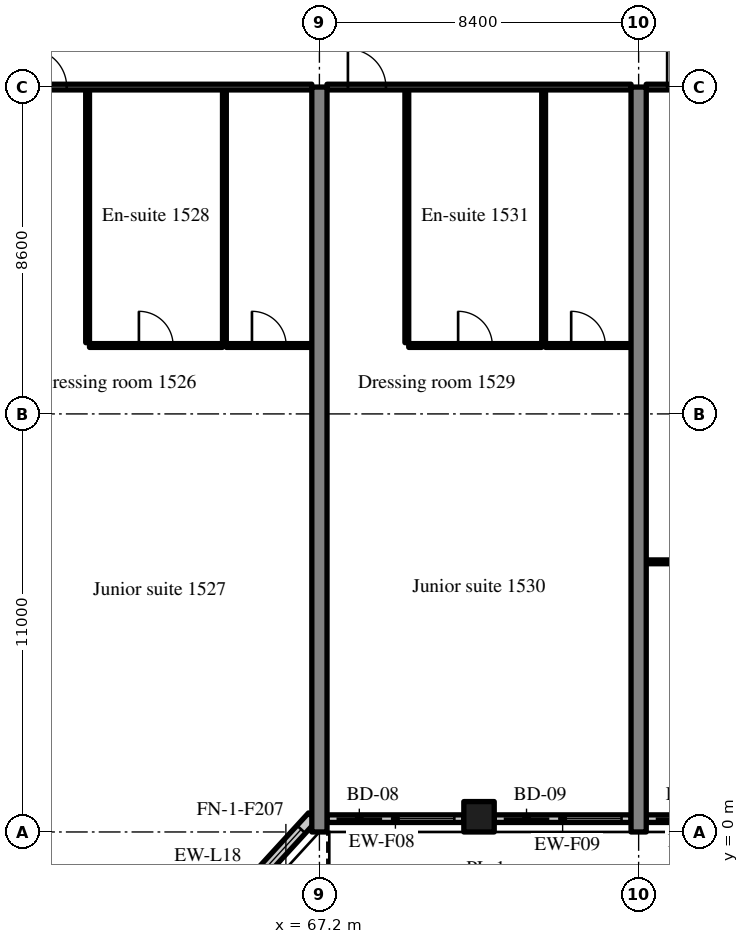
"""IFC4 building model, lengths in metres.
Left out: names, types, materials, properties, quantities, classifications, styles, units other than length and angle.
Written with IfcOpenShell. Run it as: python <this file> out.ifc"""

import sys

from ifc_helpers import new_model, si_unit, direction, frame, frame_2d, origin, origin_2d, place, context, subcontext, project, spatial, rectangle, extrude, source, transform, mapped, element, fill, save


model = new_model("IFC4")
c1 = context("Model", 3, precision=1e-05, world=origin(), true_north=direction((0.0, 1.0)))
c2 = subcontext(c1, "Body", "Model", "MODEL_VIEW")
j1 = project(units=[si_unit("LENGTHUNIT", "METRE"), si_unit("PLANEANGLEUNIT", "RADIAN")], contexts=[c1])
p1 = place(None, origin())
s1 = spatial("IfcSite", under=j1, at=p1, CompositionType="ELEMENT")
p2 = place(p1, origin())
s2 = spatial("IfcBuilding", under=s1, at=p2, CompositionType="ELEMENT")
p3 = place(p2, frame((0.0, 0.0, 65.8)))
s3 = spatial("IfcBuildingStorey", under=s2, at=p3, CompositionType="ELEMENT", Elevation=65.8)
m1 = source(origin(), c2, "Body", "SweptSolid", [
    extrude(rectangle(XDim=19.6, YDim=0.4, at=frame_2d((9.8, 0.0))), origin(), (0.0, 0.0, 1.0), 3.52),
])
for number, where, z_axis, x_axis in (
    (1, (67.2, 0.0, 0.0), (0.0, 0.0, 1.0), (0.0, 1.0, 0.0)),
    (2, (75.6, 0.0, 0.0), (0.0, 0.0, 1.0), (0.0, 1.0, 0.0)),
):
    element("IfcWall", number, at=place(p3, frame(where, z_axis=z_axis, x_axis=x_axis)), inside=s3, PredefinedType="SHEAR", context=c2, shape_type="MappedRepresentation", body=[
        mapped(m1, transform((0.0, 0.0, 0.0), scale=1.0)),
    ])
m2 = source(origin(), c2, "Body", "SweptSolid", [
    extrude(rectangle(XDim=0.8, YDim=0.8, at=origin_2d()), origin(), (0.0, 0.0, 1.0), 3.52),
])
p4 = place(p3, frame((71.4, 0.4, 0.0), z_axis=(0.0, 0.0, 1.0), x_axis=(1.0, 0.0, 0.0)))
e3 = element("IfcColumn", 3, at=p4, inside=s3, PredefinedType="COLUMN", context=c2, shape_type="MappedRepresentation", body=[
    mapped(m2, transform((0.0, 0.0, 0.0), scale=1.0)),
])
m3 = source(origin(), c2, "Body", "SweptSolid", [
    extrude(rectangle(XDim=2.398, YDim=0.3, at=frame_2d((1.199, 0.0))), origin(), (0.0, 0.0, 1.0), 3.52),
])
p5 = place(p3, frame((65.404, -1.369, 0.0), z_axis=(0.0, 0.0, 1.0), x_axis=(0.675374189419, 0.737475222815, 0.0)))
e4 = element("IfcWall", 4, at=p5, inside=s3, PredefinedType="SOLIDWALL", context=c2, shape_type="MappedRepresentation", body=[
    mapped(m3, transform((0.0, 0.0, 0.0), scale=1.0)),
])
m4 = source(origin(), c2, "Body", "SweptSolid", [
    extrude(rectangle(XDim=1.5, YDim=2.0, at=frame_2d((0.75, 1.0))), frame((0.0, 0.16, 0.0), z_axis=(0.0, -1.0, 0.0), x_axis=(1.0, 0.0, 0.0)), (0.0, 0.0, 1.0), 0.32),
])
p6 = place(p5, frame((0.449, 0.0, 0.9)))
e5 = element("IfcOpeningElement", 5, at=p6, cuts=e4, PredefinedType="OPENING", context=c2, shape_type="MappedRepresentation", body=[
    mapped(m4, transform((0.0, 0.0, 0.0), scale=1.0)),
])
m5 = source(origin(), c2, "Body", "SweptSolid", [
    extrude(rectangle(XDim=3.6, YDim=0.2, at=frame_2d((1.8, 0.0))), origin(), (0.0, 0.0, 1.0), 2.82),
])
p7 = place(p3, frame((67.4, 0.35, 0.0), z_axis=(0.0, 0.0, 1.0), x_axis=(1.0, 0.0, 0.0)))
e6 = element("IfcWall", 6, at=p7, inside=s3, PredefinedType="SOLIDWALL", context=c2, shape_type="MappedRepresentation", body=[
    mapped(m5, transform((0.0, 0.0, 0.0), scale=1.0)),
])
m6 = source(origin(), c2, "Body", "SweptSolid", [
    extrude(rectangle(XDim=1.2, YDim=2.4, at=frame_2d((0.6, 1.2))), frame((0.0, 0.11, 0.0), z_axis=(0.0, -1.0, 0.0), x_axis=(1.0, 0.0, 0.0)), (0.0, 0.0, 1.0), 0.22),
])
p8 = place(p7, frame((0.25, 0.0, 0.0)))
e7 = element("IfcOpeningElement", 7, at=p8, cuts=e6, PredefinedType="OPENING", context=c2, shape_type="MappedRepresentation", body=[
    mapped(m6, transform((0.0, 0.0, 0.0), scale=1.0)),
])
m7 = source(origin(), c2, "Body", "SweptSolid", [
    extrude(rectangle(XDim=1.5, YDim=1.5, at=frame_2d((0.75, 0.75))), frame((0.0, 0.11, 0.0), z_axis=(0.0, -1.0, 0.0), x_axis=(1.0, 0.0, 0.0)), (0.0, 0.0, 1.0), 0.22),
])
p9 = place(p7, frame((1.85, 0.0, 0.9)))
e8 = element("IfcOpeningElement", 8, at=p9, cuts=e6, PredefinedType="OPENING", context=c2, shape_type="MappedRepresentation", body=[
    mapped(m7, transform((0.0, 0.0, 0.0), scale=1.0)),
])
m8 = source(origin(), c2, "Body", "SweptSolid", [
    extrude(rectangle(XDim=3.6, YDim=0.2, at=frame_2d((1.8, 0.0))), origin(), (0.0, 0.0, 1.0), 2.82),
])
p10 = place(p3, frame((71.8, 0.35, 0.0), z_axis=(0.0, 0.0, 1.0), x_axis=(1.0, 0.0, 0.0)))
e9 = element("IfcWall", 9, at=p10, inside=s3, PredefinedType="SOLIDWALL", context=c2, shape_type="MappedRepresentation", body=[
    mapped(m8, transform((0.0, 0.0, 0.0), scale=1.0)),
])
p11 = place(p10, frame((0.25, 0.0, 0.0)))
e10 = element("IfcOpeningElement", 10, at=p11, cuts=e9, PredefinedType="OPENING", context=c2, shape_type="MappedRepresentation", body=[
    mapped(m6, transform((0.0, 0.0, 0.0), scale=1.0)),
])
p12 = place(p10, frame((1.85, 0.0, 0.9)))
e11 = element("IfcOpeningElement", 11, at=p12, cuts=e9, PredefinedType="OPENING", context=c2, shape_type="MappedRepresentation", body=[
    mapped(m7, transform((0.0, 0.0, 0.0), scale=1.0)),
])
p13 = place(p3, frame((75.8, 0.35, 0.0), z_axis=(0.0, 0.0, 1.0), x_axis=(1.0, 0.0, 0.0)))
e12 = element("IfcWall", 12, at=p13, inside=s3, PredefinedType="SOLIDWALL", context=c2, shape_type="MappedRepresentation", body=[
    mapped(m8, transform((0.0, 0.0, 0.0), scale=1.0)),
])
p14 = place(p13, frame((0.25, 0.0, 0.0)))
e13 = element("IfcOpeningElement", 13, at=p14, cuts=e12, PredefinedType="OPENING", context=c2, shape_type="MappedRepresentation", body=[
    mapped(m6, transform((0.0, 0.0, 0.0), scale=1.0)),
])
p15 = place(p13, frame((1.85, 0.0, 0.9)))
e14 = element("IfcOpeningElement", 14, at=p15, cuts=e12, PredefinedType="OPENING", context=c2, shape_type="MappedRepresentation", body=[
    mapped(m7, transform((0.0, 0.0, 0.0), scale=1.0)),
])
m9 = source(origin(), c2, "Body", "SweptSolid", [
    extrude(rectangle(XDim=6.65, YDim=0.1, at=frame_2d((3.325, 0.0))), origin(), (0.0, 0.0, 1.0), 3.52),
])
for number, where, z_axis, x_axis in (
    (15, (61.1, 12.875, 0.0), (0.0, 0.0, 1.0), (0.0, 1.0, 0.0)),
    (16, (64.7, 12.875, 0.0), (0.0, 0.0, 1.0), (0.0, 1.0, 0.0)),
):
    element("IfcWall", number, at=place(p3, frame(where, z_axis=z_axis, x_axis=x_axis)), inside=s3, PredefinedType="PARTITIONING", context=c2, shape_type="MappedRepresentation", body=[
        mapped(m9, transform((0.0, 0.0, 0.0), scale=1.0)),
    ])
m10 = source(origin(), c2, "Body", "SweptSolid", [
    extrude(rectangle(XDim=3.5, YDim=0.1, at=frame_2d((1.75, 0.0))), origin(), (0.0, 0.0, 1.0), 3.52),
])
p16 = place(p3, frame((61.15, 12.8, 0.0), z_axis=(0.0, 0.0, 1.0), x_axis=(1.0, 0.0, 0.0)))
e17 = element("IfcWall", 17, at=p16, inside=s3, PredefinedType="PARTITIONING", context=c2, shape_type="MappedRepresentation", body=[
    mapped(m10, transform((0.0, 0.0, 0.0), scale=1.0)),
])
m11 = source(origin(), c2, "Body", "SweptSolid", [
    extrude(rectangle(XDim=0.9, YDim=2.1, at=frame_2d((0.45, 1.05))), frame((0.0, 0.06, 0.0), z_axis=(0.0, -1.0, 0.0), x_axis=(1.0, 0.0, 0.0)), (0.0, 0.0, 1.0), 0.12),
])
p17 = place(p16, frame((1.3, 0.0, 0.0)))
e18 = element("IfcOpeningElement", 18, at=p17, cuts=e17, PredefinedType="OPENING", context=c2, shape_type="MappedRepresentation", body=[
    mapped(m11, transform((0.0, 0.0, 0.0), scale=1.0)),
])
m12 = source(origin(), c2, "Body", "SweptSolid", [
    extrude(rectangle(XDim=2.25, YDim=0.1, at=frame_2d((1.125, 0.0))), origin(), (0.0, 0.0, 1.0), 3.52),
])
p18 = place(p3, frame((64.75, 12.8, 0.0), z_axis=(0.0, 0.0, 1.0), x_axis=(1.0, 0.0, 0.0)))
e19 = element("IfcWall", 19, at=p18, inside=s3, PredefinedType="PARTITIONING", context=c2, shape_type="MappedRepresentation", body=[
    mapped(m12, transform((0.0, 0.0, 0.0), scale=1.0)),
])
p19 = place(p18, frame((0.675, 0.0, 0.0)))
e20 = element("IfcOpeningElement", 20, at=p19, cuts=e19, PredefinedType="OPENING", context=c2, shape_type="MappedRepresentation", body=[
    mapped(m11, transform((0.0, 0.0, 0.0), scale=1.0)),
])
m13 = source(origin(), c2, "Body", "SweptSolid", [
    extrude(rectangle(XDim=8.0, YDim=0.15, at=frame_2d((4.0, 0.0))), origin(), (0.0, 0.0, 1.0), 2.82),
])
p20 = place(p3, frame((59.0, 19.6, 0.0), z_axis=(0.0, 0.0, 1.0), x_axis=(1.0, 0.0, 0.0)))
e21 = element("IfcWall", 21, at=p20, inside=s3, PredefinedType="PARTITIONING", context=c2, shape_type="MappedRepresentation", body=[
    mapped(m13, transform((0.0, 0.0, 0.0), scale=1.0)),
])
m14 = source(origin(), c2, "Body", "SweptSolid", [
    extrude(rectangle(XDim=1.0, YDim=2.1, at=frame_2d((0.5, 1.05))), frame((0.0, 0.085, 0.0), z_axis=(0.0, -1.0, 0.0), x_axis=(1.0, 0.0, 0.0)), (0.0, 0.0, 1.0), 0.17),
])
p21 = place(p20, frame((0.55, 0.0, 0.0)))
e22 = element("IfcOpeningElement", 22, at=p21, cuts=e21, PredefinedType="OPENING", context=c2, shape_type="MappedRepresentation", body=[
    mapped(m14, transform((0.0, 0.0, 0.0), scale=1.0)),
])
for number, where, z_axis, x_axis in (
    (23, (69.5, 12.875, 0.0), (0.0, 0.0, 1.0), (0.0, 1.0, 0.0)),
    (24, (73.1, 12.875, 0.0), (0.0, 0.0, 1.0), (0.0, 1.0, 0.0)),
):
    element("IfcWall", number, at=place(p3, frame(where, z_axis=z_axis, x_axis=x_axis)), inside=s3, PredefinedType="PARTITIONING", context=c2, shape_type="MappedRepresentation", body=[
        mapped(m9, transform((0.0, 0.0, 0.0), scale=1.0)),
    ])
p22 = place(p3, frame((69.55, 12.8, 0.0), z_axis=(0.0, 0.0, 1.0), x_axis=(1.0, 0.0, 0.0)))
e25 = element("IfcWall", 25, at=p22, inside=s3, PredefinedType="PARTITIONING", context=c2, shape_type="MappedRepresentation", body=[
    mapped(m10, transform((0.0, 0.0, 0.0), scale=1.0)),
])
p23 = place(p22, frame((1.3, 0.0, 0.0)))
e26 = element("IfcOpeningElement", 26, at=p23, cuts=e25, PredefinedType="OPENING", context=c2, shape_type="MappedRepresentation", body=[
    mapped(m11, transform((0.0, 0.0, 0.0), scale=1.0)),
])
p24 = place(p3, frame((73.15, 12.8, 0.0), z_axis=(0.0, 0.0, 1.0), x_axis=(1.0, 0.0, 0.0)))
e27 = element("IfcWall", 27, at=p24, inside=s3, PredefinedType="PARTITIONING", context=c2, shape_type="MappedRepresentation", body=[
    mapped(m12, transform((0.0, 0.0, 0.0), scale=1.0)),
])
p25 = place(p24, frame((0.675, 0.0, 0.0)))
e28 = element("IfcOpeningElement", 28, at=p25, cuts=e27, PredefinedType="OPENING", context=c2, shape_type="MappedRepresentation", body=[
    mapped(m11, transform((0.0, 0.0, 0.0), scale=1.0)),
])
p26 = place(p3, frame((67.4, 19.6, 0.0), z_axis=(0.0, 0.0, 1.0), x_axis=(1.0, 0.0, 0.0)))
e29 = element("IfcWall", 29, at=p26, inside=s3, PredefinedType="PARTITIONING", context=c2, shape_type="MappedRepresentation", body=[
    mapped(m13, transform((0.0, 0.0, 0.0), scale=1.0)),
])
p27 = place(p26, frame((0.55, 0.0, 0.0)))
e30 = element("IfcOpeningElement", 30, at=p27, cuts=e29, PredefinedType="OPENING", context=c2, shape_type="MappedRepresentation", body=[
    mapped(m14, transform((0.0, 0.0, 0.0), scale=1.0)),
])
m15 = source(origin(), c2, "Body", "SweptSolid", [
    extrude(rectangle(XDim=8.0, YDim=0.1, at=frame_2d((4.0, 0.0))), origin(), (0.0, 0.0, 1.0), 3.52),
])
p28 = place(p3, frame((75.8, 7.108, 0.0), z_axis=(0.0, 0.0, 1.0), x_axis=(1.0, 0.0, 0.0)))
e31 = element("IfcWall", 31, at=p28, inside=s3, PredefinedType="PARTITIONING", context=c2, shape_type="MappedRepresentation", body=[
    mapped(m15, transform((0.0, 0.0, 0.0), scale=1.0)),
])
m16 = source(origin(), c2, "Body", "SweptSolid", [
    extrude(rectangle(XDim=1.8, YDim=2.1, at=frame_2d((0.9, 1.05))), frame((0.0, 0.06, 0.0), z_axis=(0.0, -1.0, 0.0), x_axis=(1.0, 0.0, 0.0)), (0.0, 0.0, 1.0), 0.12),
])
p29 = place(p28, frame((3.1, 0.0, 0.0)))
e32 = element("IfcOpeningElement", 32, at=p29, cuts=e31, PredefinedType="OPENING", context=c2, shape_type="MappedRepresentation", body=[
    mapped(m16, transform((0.0, 0.0, 0.0), scale=1.0)),
])
p30 = place(p3, frame((75.8, 19.6, 0.0), z_axis=(0.0, 0.0, 1.0), x_axis=(1.0, 0.0, 0.0)))
e33 = element("IfcWall", 33, at=p30, inside=s3, PredefinedType="PARTITIONING", context=c2, shape_type="MappedRepresentation", body=[
    mapped(m13, transform((0.0, 0.0, 0.0), scale=1.0)),
])
p31 = place(p30, frame((0.55, 0.0, 0.0)))
e34 = element("IfcOpeningElement", 34, at=p31, cuts=e33, PredefinedType="OPENING", context=c2, shape_type="MappedRepresentation", body=[
    mapped(m14, transform((0.0, 0.0, 0.0), scale=1.0)),
])
m17 = source(origin(), c2, "Body", "SweptSolid", [
    extrude(rectangle(XDim=1.5, YDim=2.0, at=frame_2d((0.75, 1.0))), frame((0.0, 0.03, 0.0), z_axis=(0.0, -1.0, 0.0), x_axis=(1.0, 0.0, 0.0)), (0.0, 0.0, 1.0), 0.06),
])
p32 = place(p6, origin())
e35 = element("IfcWindow", 35, at=p32, inside=s3, PartitioningType="SINGLE_PANEL", PredefinedType="WINDOW", context=c2, shape_type="MappedRepresentation", body=[
    mapped(m17, transform((0.0, 0.0, 0.0), scale=1.0)),
])
fill(e5, e35)
m18 = source(origin(), c2, "Body", "SweptSolid", [
    extrude(rectangle(XDim=1.2, YDim=2.4, at=frame_2d((0.6, 1.2))), frame((0.0, 0.025, 0.0), z_axis=(0.0, -1.0, 0.0), x_axis=(1.0, 0.0, 0.0)), (0.0, 0.0, 1.0), 0.05),
])
p33 = place(p8, origin())
e36 = element("IfcDoor", 36, at=p33, inside=s3, OperationType="SLIDING_TO_RIGHT", PredefinedType="DOOR", context=c2, shape_type="MappedRepresentation", body=[
    mapped(m18, transform((0.0, 0.0, 0.0), scale=1.0)),
])
fill(e7, e36)
m19 = source(origin(), c2, "Body", "SweptSolid", [
    extrude(rectangle(XDim=1.5, YDim=1.5, at=frame_2d((0.75, 0.75))), frame((0.0, 0.03, 0.0), z_axis=(0.0, -1.0, 0.0), x_axis=(1.0, 0.0, 0.0)), (0.0, 0.0, 1.0), 0.06),
])
p34 = place(p9, origin())
e37 = element("IfcWindow", 37, at=p34, inside=s3, PartitioningType="SINGLE_PANEL", PredefinedType="WINDOW", context=c2, shape_type="MappedRepresentation", body=[
    mapped(m19, transform((0.0, 0.0, 0.0), scale=1.0)),
])
fill(e8, e37)
p35 = place(p11, origin())
e38 = element("IfcDoor", 38, at=p35, inside=s3, OperationType="SLIDING_TO_LEFT", PredefinedType="DOOR", context=c2, shape_type="MappedRepresentation", body=[
    mapped(m18, transform((0.0, 0.0, 0.0), scale=1.0)),
])
fill(e10, e38)
p36 = place(p12, origin())
e39 = element("IfcWindow", 39, at=p36, inside=s3, PartitioningType="SINGLE_PANEL", PredefinedType="WINDOW", context=c2, shape_type="MappedRepresentation", body=[
    mapped(m19, transform((0.0, 0.0, 0.0), scale=1.0)),
])
fill(e11, e39)
p37 = place(p14, origin())
e40 = element("IfcDoor", 40, at=p37, inside=s3, OperationType="SLIDING_TO_RIGHT", PredefinedType="DOOR", context=c2, shape_type="MappedRepresentation", body=[
    mapped(m18, transform((0.0, 0.0, 0.0), scale=1.0)),
])
fill(e13, e40)
m20 = source(origin(), c2, "Body", "SweptSolid", [
    extrude(rectangle(XDim=0.9, YDim=2.1, at=frame_2d((0.45, 1.05))), frame((0.0, 0.025, 0.0), z_axis=(0.0, -1.0, 0.0), x_axis=(1.0, 0.0, 0.0)), (0.0, 0.0, 1.0), 0.05),
])
p38 = place(p17, origin())
e41 = element("IfcDoor", 41, at=p38, inside=s3, OperationType="SINGLE_SWING_LEFT", PredefinedType="DOOR", context=c2, shape_type="MappedRepresentation", body=[
    mapped(m20, transform((0.0, 0.0, 0.0), scale=1.0)),
])
fill(e18, e41)
p39 = place(p19, origin())
e42 = element("IfcDoor", 42, at=p39, inside=s3, OperationType="SINGLE_SWING_LEFT", PredefinedType="DOOR", context=c2, shape_type="MappedRepresentation", body=[
    mapped(m20, transform((0.0, 0.0, 0.0), scale=1.0)),
])
fill(e20, e42)
m21 = source(origin(), c2, "Body", "SweptSolid", [
    extrude(rectangle(XDim=1.0, YDim=2.1, at=frame_2d((0.5, 1.05))), frame((0.0, 0.025, 0.0), z_axis=(0.0, -1.0, 0.0), x_axis=(1.0, 0.0, 0.0)), (0.0, 0.0, 1.0), 0.05),
])
p40 = place(p21, origin())
e43 = element("IfcDoor", 43, at=p40, inside=s3, OperationType="SINGLE_SWING_LEFT", PredefinedType="DOOR", context=c2, shape_type="MappedRepresentation", body=[
    mapped(m21, transform((0.0, 0.0, 0.0), scale=1.0)),
])
fill(e22, e43)
p41 = place(p23, origin())
e44 = element("IfcDoor", 44, at=p41, inside=s3, OperationType="SINGLE_SWING_LEFT", PredefinedType="DOOR", context=c2, shape_type="MappedRepresentation", body=[
    mapped(m20, transform((0.0, 0.0, 0.0), scale=1.0)),
])
fill(e26, e44)
p42 = place(p25, origin())
e45 = element("IfcDoor", 45, at=p42, inside=s3, OperationType="SINGLE_SWING_LEFT", PredefinedType="DOOR", context=c2, shape_type="MappedRepresentation", body=[
    mapped(m20, transform((0.0, 0.0, 0.0), scale=1.0)),
])
fill(e28, e45)
p43 = place(p27, origin())
e46 = element("IfcDoor", 46, at=p43, inside=s3, OperationType="SINGLE_SWING_LEFT", PredefinedType="DOOR", context=c2, shape_type="MappedRepresentation", body=[
    mapped(m21, transform((0.0, 0.0, 0.0), scale=1.0)),
])
fill(e30, e46)
p44 = place(p31, origin())
e47 = element("IfcDoor", 47, at=p44, inside=s3, OperationType="SINGLE_SWING_LEFT", PredefinedType="DOOR", context=c2, shape_type="MappedRepresentation", body=[
    mapped(m21, transform((0.0, 0.0, 0.0), scale=1.0)),
])
fill(e34, e47)
save(model, sys.argv[1])
